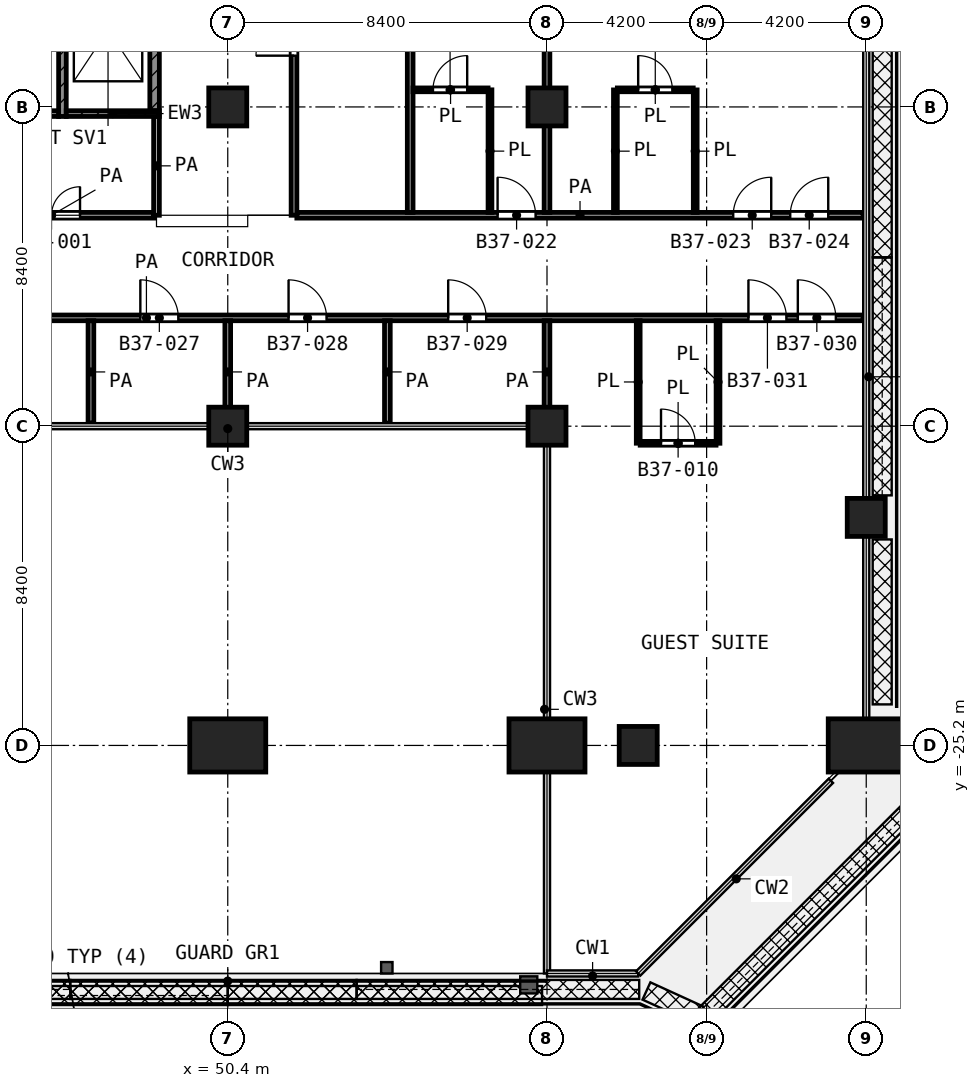
"""IFC4 building model, lengths in metres.
Left out: names, types, materials, properties, quantities, classifications, styles, units other than length and angle.
Written with IfcOpenShell. Run it as: python <this file> out.ifc"""

import sys

from ifc_helpers import new_model, si_unit, direction, frame, frame_2d, origin, origin_2d, place, context, subcontext, project, spatial, rectangle, extrude, element, fill, save


model = new_model("IFC4")
c1 = context("Model", 3, precision=1e-05, world=origin(), true_north=direction((0.0, 1.0)))
c2 = subcontext(c1, "Body", "Model", "MODEL_VIEW")
j1 = project(units=[si_unit("LENGTHUNIT", "METRE"), si_unit("PLANEANGLEUNIT", "RADIAN")], contexts=[c1])
p1 = place(None, origin())
s1 = spatial("IfcSite", under=j1, at=p1, CompositionType="ELEMENT")
p2 = place(p1, origin())
s2 = spatial("IfcBuilding", under=s1, at=p2, CompositionType="ELEMENT")
p3 = place(p2, frame((0.0, 0.0, 162.6)))
s3 = spatial("IfcBuildingStorey", under=s2, at=p3, CompositionType="ELEMENT", Elevation=162.6)
for number, where, z_axis, x_axis in (
    (1, (50.4, -8.4, 0.0), (0.0, 0.0, 1.0), (1.0, 0.0, 0.0)),
    (2, (58.8, -8.4, 0.0), (0.0, 0.0, 1.0), (1.0, 0.0, 0.0)),
    (3, (50.4, -16.8, 0.0), (0.0, 0.0, 1.0), (1.0, 0.0, 0.0)),
    (4, (58.8, -16.8, 0.0), (0.0, 0.0, 1.0), (1.0, 0.0, 0.0)),
    (5, (67.2, -19.2, 0.0), (0.0, 0.0, 1.0), (1.0, 0.0, 0.0)),
):
    element("IfcColumn", number, at=place(p3, frame(where, z_axis=z_axis, x_axis=x_axis)), inside=s3, PredefinedType="COLUMN", context=c2, shape_type="SweptSolid", body=[
        extrude(rectangle(XDim=1.0, YDim=1.0, at=origin_2d()), origin(), (0.0, 0.0, 1.0), 4.2),
    ])
p4 = place(p3, frame((50.4, -25.2, 0.0), z_axis=(0.0, 0.0, 1.0), x_axis=(-1.0, 0.0, 0.0)))
e6 = element("IfcColumn", 6, at=p4, inside=s3, PredefinedType="COLUMN", context=c2, shape_type="SweptSolid", body=[
    extrude(rectangle(XDim=2.0, YDim=1.4, at=origin_2d()), origin(), (0.0, 0.0, 1.0), 4.2),
])
p5 = place(p3, frame((61.2, -25.2, 0.0), z_axis=(0.0, 0.0, 1.0), x_axis=(1.0, 0.0, 0.0)))
e7 = element("IfcColumn", 7, at=p5, inside=s3, PredefinedType="COLUMN", context=c2, shape_type="SweptSolid", body=[
    extrude(rectangle(XDim=1.0, YDim=1.0, at=origin_2d()), origin(), (0.0, 0.0, 1.0), 4.2),
])
for number, where, z_axis, x_axis in (
    (8, (67.2, -25.2, 0.0), (0.0, 0.0, 1.0), (-1.0, 0.0, 0.0)),
    (9, (58.8, -25.2, 0.0), (0.0, 0.0, 1.0), (-1.0, 0.0, 0.0)),
):
    element("IfcColumn", number, at=place(p3, frame(where, z_axis=z_axis, x_axis=x_axis)), inside=s3, PredefinedType="COLUMN", context=c2, shape_type="SweptSolid", body=[
        extrude(rectangle(XDim=2.0, YDim=1.4, at=origin_2d()), origin(), (0.0, 0.0, 1.0), 4.2),
    ])
p6 = place(p3, frame((46.05, -8.65, 0.0), z_axis=(0.0, 0.0, 1.0), x_axis=(0.0, 1.0, 0.0)))
e10 = element("IfcWall", 10, at=p6, inside=s3, PredefinedType="SHEAR", context=c2, shape_type="SweptSolid", body=[
    extrude(rectangle(XDim=8.35, YDim=0.2, at=frame_2d((4.175, 0.0))), origin(), (0.0, 0.0, 1.0), 3.6),
])
p7 = place(p6, frame((7.0, 0.0, 0.0)))
e11 = element("IfcOpeningElement", 11, at=p7, cuts=e10, PredefinedType="OPENING", context=c2, shape_type="SweptSolid", body=[
    extrude(rectangle(XDim=1.1, YDim=2.1, at=frame_2d((0.55, 1.05))), frame((0.0, 0.11, 0.0), z_axis=(0.0, -1.0, 0.0), x_axis=(1.0, 0.0, 0.0)), (0.0, 0.0, 1.0), 0.22),
])
p8 = place(p3, frame((43.1, -8.575, 0.0), z_axis=(0.0, 0.0, 1.0), x_axis=(1.0, 0.0, 0.0)))
e12 = element("IfcWall", 12, at=p8, inside=s3, PredefinedType="SHEAR", context=c2, shape_type="SweptSolid", body=[
    extrude(rectangle(XDim=2.85, YDim=0.15, at=frame_2d((1.425, 0.0))), origin(), (0.0, 0.0, 1.0), 3.6),
])
p9 = place(p3, frame((46.15, -8.575, 0.0), z_axis=(0.0, 0.0, 1.0), x_axis=(1.0, 0.0, 0.0)))
e13 = element("IfcWall", 13, at=p9, inside=s3, PredefinedType="SHEAR", context=c2, shape_type="SweptSolid", body=[
    extrude(rectangle(XDim=2.45, YDim=0.15, at=frame_2d((1.225, 0.0))), origin(), (0.0, 0.0, 1.0), 3.6),
])
p10 = place(p3, frame((48.475, -8.5, 0.0), z_axis=(0.0, 0.0, 1.0), x_axis=(0.0, 1.0, 0.0)))
e14 = element("IfcWall", 14, at=p10, inside=s3, PredefinedType="SHEAR", context=c2, shape_type="SweptSolid", body=[
    extrude(rectangle(XDim=3.475, YDim=0.25, at=frame_2d((1.738, 0.0))), origin(), (0.0, 0.0, 1.0), 3.6),
])
p11 = place(p3, frame((61.252, -17.25, 0.0), z_axis=(0.0, 0.0, 1.0), x_axis=(1.0, 0.0, 0.0)))
e15 = element("IfcWall", 15, at=p11, inside=s3, PredefinedType="PARTITIONING", context=c2, shape_type="SweptSolid", body=[
    extrude(rectangle(XDim=1.996, YDim=0.1, at=frame_2d((0.998, 0.0))), origin(), (0.0, 0.0, 1.0), 3.6),
])
p12 = place(p11, frame((0.548, 0.0, 0.0)))
e16 = element("IfcOpeningElement", 16, at=p12, cuts=e15, PredefinedType="OPENING", context=c2, shape_type="SweptSolid", body=[
    extrude(rectangle(XDim=0.9, YDim=2.1, at=frame_2d((0.45, 1.05))), frame((0.0, 0.06, 0.0), z_axis=(0.0, -1.0, 0.0), x_axis=(1.0, 0.0, 0.0)), (0.0, 0.0, 1.0), 0.12),
])
p13 = place(p3, frame((55.275, -7.95, 0.0), z_axis=(0.0, 0.0, 1.0), x_axis=(1.0, 0.0, 0.0)))
e17 = element("IfcWall", 17, at=p13, inside=s3, PredefinedType="PARTITIONING", context=c2, shape_type="SweptSolid", body=[
    extrude(rectangle(XDim=1.975, YDim=0.1, at=frame_2d((0.988, 0.0))), origin(), (0.0, 0.0, 1.0), 3.6),
])
p14 = place(p13, frame((0.525, 0.0, 0.0)))
e18 = element("IfcOpeningElement", 18, at=p14, cuts=e17, PredefinedType="OPENING", context=c2, shape_type="SweptSolid", body=[
    extrude(rectangle(XDim=0.9, YDim=2.1, at=frame_2d((0.45, 1.05))), frame((0.0, 0.06, 0.0), z_axis=(0.0, -1.0, 0.0), x_axis=(1.0, 0.0, 0.0)), (0.0, 0.0, 1.0), 0.12),
])
p15 = place(p3, frame((60.651, -7.95, 0.0), z_axis=(0.0, 0.0, 1.0), x_axis=(1.0, 0.0, 0.0)))
e19 = element("IfcWall", 19, at=p15, inside=s3, PredefinedType="PARTITIONING", context=c2, shape_type="SweptSolid", body=[
    extrude(rectangle(XDim=1.997, YDim=0.1, at=frame_2d((0.999, 0.0))), origin(), (0.0, 0.0, 1.0), 3.6),
])
p16 = place(p15, frame((0.548, 0.0, 0.0)))
e20 = element("IfcOpeningElement", 20, at=p16, cuts=e19, PredefinedType="OPENING", context=c2, shape_type="SweptSolid", body=[
    extrude(rectangle(XDim=0.9, YDim=2.1, at=frame_2d((0.45, 1.05))), frame((0.0, 0.06, 0.0), z_axis=(0.0, -1.0, 0.0), x_axis=(1.0, 0.0, 0.0)), (0.0, 0.0, 1.0), 0.12),
])
p17 = place(p3, frame((57.3, -11.175, 0.0), z_axis=(0.0, 0.0, 1.0), x_axis=(0.0, 1.0, 0.0)))
e21 = element("IfcWall", 21, at=p17, inside=s3, PredefinedType="PARTITIONING", context=c2, shape_type="SweptSolid", body=[
    extrude(rectangle(XDim=3.225, YDim=0.1, at=frame_2d((1.613, 0.0))), origin(), (0.0, 0.0, 1.0), 3.6),
])
for number, where, z_axis, x_axis in (
    (22, (60.6, -11.175, 0.0), (0.0, 0.0, 1.0), (0.0, 1.0, 0.0)),
    (23, (61.2, -17.248, 0.0), (0.0, 0.0, 1.0), (0.0, 1.0, 0.0)),
    (24, (62.7, -11.175, 0.0), (0.0, 0.0, 1.0), (0.0, 1.0, 0.0)),
):
    element("IfcWall", number, at=place(p3, frame(where, z_axis=z_axis, x_axis=x_axis)), inside=s3, PredefinedType="PARTITIONING", context=c2, shape_type="SweptSolid", body=[
        extrude(rectangle(XDim=3.223, YDim=0.1, at=frame_2d((1.612, 0.0))), origin(), (0.0, 0.0, 1.0), 3.6),
    ])
p18 = place(p3, frame((63.3, -17.249, 0.0), z_axis=(0.0, 0.0, 1.0), x_axis=(0.0, 1.0, 0.0)))
e25 = element("IfcWall", 25, at=p18, inside=s3, PredefinedType="PARTITIONING", context=c2, shape_type="SweptSolid", body=[
    extrude(rectangle(XDim=3.224, YDim=0.1, at=frame_2d((1.612, 0.0))), origin(), (0.0, 0.0, 1.0), 3.6),
])
p19 = place(p3, frame((29.4, -13.95, 0.0), z_axis=(0.0, 0.0, 1.0), x_axis=(1.0, 0.0, 0.0)))
e26 = element("IfcWall", 26, at=p19, inside=s3, PredefinedType="PARTITIONING", context=c2, shape_type="SweptSolid", body=[
    extrude(rectangle(XDim=37.72, YDim=0.15, at=frame_2d((18.86, 0.0))), origin(), (0.0, 0.0, 1.0), 3.6),
])
p20 = place(p19, frame((14.6, 0.0, 0.0)))
e27 = element("IfcOpeningElement", 27, at=p20, cuts=e26, PredefinedType="OPENING", context=c2, shape_type="SweptSolid", body=[
    extrude(rectangle(XDim=1.0, YDim=2.1, at=frame_2d((0.5, 1.05))), frame((0.0, 0.085, 0.0), z_axis=(0.0, -1.0, 0.0), x_axis=(1.0, 0.0, 0.0)), (0.0, 0.0, 1.0), 0.17),
])
p21 = place(p19, frame((12.3, 0.0, 0.0)))
e28 = element("IfcOpeningElement", 28, at=p21, cuts=e26, PredefinedType="OPENING", context=c2, shape_type="SweptSolid", body=[
    extrude(rectangle(XDim=1.0, YDim=2.1, at=frame_2d((0.5, 1.05))), frame((0.0, 0.085, 0.0), z_axis=(0.0, -1.0, 0.0), x_axis=(1.0, 0.0, 0.0)), (0.0, 0.0, 1.0), 0.17),
])
p22 = place(p19, frame((18.7, 0.0, 0.0)))
e29 = element("IfcOpeningElement", 29, at=p22, cuts=e26, PredefinedType="OPENING", context=c2, shape_type="SweptSolid", body=[
    extrude(rectangle(XDim=1.0, YDim=2.1, at=frame_2d((0.5, 1.05))), frame((0.0, 0.085, 0.0), z_axis=(0.0, -1.0, 0.0), x_axis=(1.0, 0.0, 0.0)), (0.0, 0.0, 1.0), 0.17),
])
p23 = place(p19, frame((22.6, 0.0, 0.0)))
e30 = element("IfcOpeningElement", 30, at=p23, cuts=e26, PredefinedType="OPENING", context=c2, shape_type="SweptSolid", body=[
    extrude(rectangle(XDim=1.0, YDim=2.1, at=frame_2d((0.5, 1.05))), frame((0.0, 0.085, 0.0), z_axis=(0.0, -1.0, 0.0), x_axis=(1.0, 0.0, 0.0)), (0.0, 0.0, 1.0), 0.17),
])
p24 = place(p19, frame((26.8, 0.0, 0.0)))
e31 = element("IfcOpeningElement", 31, at=p24, cuts=e26, PredefinedType="OPENING", context=c2, shape_type="SweptSolid", body=[
    extrude(rectangle(XDim=1.0, YDim=2.1, at=frame_2d((0.5, 1.05))), frame((0.0, 0.085, 0.0), z_axis=(0.0, -1.0, 0.0), x_axis=(1.0, 0.0, 0.0)), (0.0, 0.0, 1.0), 0.17),
])
p25 = place(p19, frame((36.0, 0.0, 0.0)))
e32 = element("IfcOpeningElement", 32, at=p25, cuts=e26, PredefinedType="OPENING", context=c2, shape_type="SweptSolid", body=[
    extrude(rectangle(XDim=1.0, YDim=2.1, at=frame_2d((0.5, 1.05))), frame((0.0, 0.085, 0.0), z_axis=(0.0, -1.0, 0.0), x_axis=(1.0, 0.0, 0.0)), (0.0, 0.0, 1.0), 0.17),
])
p26 = place(p19, frame((34.7, 0.0, 0.0)))
e33 = element("IfcOpeningElement", 33, at=p26, cuts=e26, PredefinedType="OPENING", context=c2, shape_type="SweptSolid", body=[
    extrude(rectangle(XDim=1.0, YDim=2.1, at=frame_2d((0.5, 1.05))), frame((0.0, 0.085, 0.0), z_axis=(0.0, -1.0, 0.0), x_axis=(1.0, 0.0, 0.0)), (0.0, 0.0, 1.0), 0.17),
])
p27 = place(p19, frame((0.6, 0.0, 0.0)))
e34 = element("IfcOpeningElement", 34, at=p27, cuts=e26, PredefinedType="OPENING", context=c2, shape_type="SweptSolid", body=[
    extrude(rectangle(XDim=0.9, YDim=2.1, at=frame_2d((0.45, 1.05))), frame((0.0, 0.085, 0.0), z_axis=(0.0, -1.0, 0.0), x_axis=(1.0, 0.0, 0.0)), (0.0, 0.0, 1.0), 0.17),
])
p28 = place(p19, frame((2.65, 0.0, 0.0)))
e35 = element("IfcOpeningElement", 35, at=p28, cuts=e26, PredefinedType="OPENING", context=c2, shape_type="SweptSolid", body=[
    extrude(rectangle(XDim=1.0, YDim=2.1, at=frame_2d((0.5, 1.05))), frame((0.0, 0.085, 0.0), z_axis=(0.0, -1.0, 0.0), x_axis=(1.0, 0.0, 0.0)), (0.0, 0.0, 1.0), 0.17),
])
p29 = place(p19, frame((5.55, 0.0, 0.0)))
e36 = element("IfcOpeningElement", 36, at=p29, cuts=e26, PredefinedType="OPENING", context=c2, shape_type="SweptSolid", body=[
    extrude(rectangle(XDim=1.5, YDim=2.1, at=frame_2d((0.75, 1.05))), frame((0.0, 0.085, 0.0), z_axis=(0.0, -1.0, 0.0), x_axis=(1.0, 0.0, 0.0)), (0.0, 0.0, 1.0), 0.17),
])
p30 = place(p3, frame((43.075, -11.25, 0.0), z_axis=(0.0, 0.0, 1.0), x_axis=(1.0, 0.0, 0.0)))
e37 = element("IfcWall", 37, at=p30, inside=s3, PredefinedType="PARTITIONING", context=c2, shape_type="SweptSolid", body=[
    extrude(rectangle(XDim=5.375, YDim=0.15, at=frame_2d((2.688, 0.0))), origin(), (0.0, 0.0, 1.0), 3.6),
])
p31 = place(p30, frame((1.938, 0.0, 0.0)))
e38 = element("IfcOpeningElement", 38, at=p31, cuts=e37, PredefinedType="OPENING", context=c2, shape_type="SweptSolid", body=[
    extrude(rectangle(XDim=1.5, YDim=2.1, at=frame_2d((0.75, 1.05))), frame((0.0, 0.085, 0.0), z_axis=(0.0, -1.0, 0.0), x_axis=(1.0, 0.0, 0.0)), (0.0, 0.0, 1.0), 0.17),
])
p32 = place(p3, frame((52.218, -11.25, 0.0), z_axis=(0.0, 0.0, 1.0), x_axis=(1.0, 0.0, 0.0)))
e39 = element("IfcWall", 39, at=p32, inside=s3, PredefinedType="PARTITIONING", context=c2, shape_type="SweptSolid", body=[
    extrude(rectangle(XDim=14.902, YDim=0.15, at=frame_2d((7.451, 0.0))), origin(), (0.0, 0.0, 1.0), 3.6),
])
p33 = place(p32, frame((5.282, 0.0, 0.0)))
e40 = element("IfcOpeningElement", 40, at=p33, cuts=e39, PredefinedType="OPENING", context=c2, shape_type="SweptSolid", body=[
    extrude(rectangle(XDim=1.0, YDim=2.1, at=frame_2d((0.5, 1.05))), frame((0.0, 0.085, 0.0), z_axis=(0.0, -1.0, 0.0), x_axis=(1.0, 0.0, 0.0)), (0.0, 0.0, 1.0), 0.17),
])
p34 = place(p32, frame((11.482, 0.0, 0.0)))
e41 = element("IfcOpeningElement", 41, at=p34, cuts=e39, PredefinedType="OPENING", context=c2, shape_type="SweptSolid", body=[
    extrude(rectangle(XDim=1.0, YDim=2.1, at=frame_2d((0.5, 1.05))), frame((0.0, 0.085, 0.0), z_axis=(0.0, -1.0, 0.0), x_axis=(1.0, 0.0, 0.0)), (0.0, 0.0, 1.0), 0.17),
])
p35 = place(p32, frame((12.982, 0.0, 0.0)))
e42 = element("IfcOpeningElement", 42, at=p35, cuts=e39, PredefinedType="OPENING", context=c2, shape_type="SweptSolid", body=[
    extrude(rectangle(XDim=1.0, YDim=2.1, at=frame_2d((0.5, 1.05))), frame((0.0, 0.085, 0.0), z_axis=(0.0, -1.0, 0.0), x_axis=(1.0, 0.0, 0.0)), (0.0, 0.0, 1.0), 0.17),
])
p36 = place(p3, frame((46.8, -16.72, 0.0), z_axis=(0.0, 0.0, 1.0), x_axis=(0.0, 1.0, 0.0)))
e43 = element("IfcWall", 43, at=p36, inside=s3, PredefinedType="PARTITIONING", context=c2, shape_type="SweptSolid", body=[
    extrude(rectangle(XDim=2.695, YDim=0.15, at=frame_2d((1.348, 0.0))), origin(), (0.0, 0.0, 1.0), 3.6),
])
p37 = place(p3, frame((48.525, -11.25, 0.0), z_axis=(0.0, 0.0, 1.0), x_axis=(0.0, 1.0, 0.0)))
e44 = element("IfcWall", 44, at=p37, inside=s3, PredefinedType="PARTITIONING", context=c2, shape_type="SweptSolid", body=[
    extrude(rectangle(XDim=2.6, YDim=0.15, at=frame_2d((1.3, 0.0))), origin(), (0.0, 0.0, 1.0), 3.6),
])
p38 = place(p3, frame((50.4, -16.72, 0.0), z_axis=(0.0, 0.0, 1.0), x_axis=(0.0, 1.0, 0.0)))
e45 = element("IfcWall", 45, at=p38, inside=s3, PredefinedType="PARTITIONING", context=c2, shape_type="SweptSolid", body=[
    extrude(rectangle(XDim=2.695, YDim=0.15, at=frame_2d((1.348, 0.0))), origin(), (0.0, 0.0, 1.0), 3.6),
])
p39 = place(p3, frame((52.143, -11.25, 0.0), z_axis=(0.0, 0.0, 1.0), x_axis=(0.0, 1.0, 0.0)))
e46 = element("IfcWall", 46, at=p39, inside=s3, PredefinedType="PARTITIONING", context=c2, shape_type="SweptSolid", body=[
    extrude(rectangle(XDim=9.397, YDim=0.15, at=frame_2d((4.698, 0.0))), origin(), (0.0, 0.0, 1.0), 3.6),
])
p40 = place(p39, frame((4.199, 0.0, 0.0)))
e47 = element("IfcOpeningElement", 47, at=p40, cuts=e46, PredefinedType="OPENING", context=c2, shape_type="SweptSolid", body=[
    extrude(rectangle(XDim=1.0, YDim=2.1, at=frame_2d((0.5, 1.05))), frame((0.0, 0.085, 0.0), z_axis=(0.0, -1.0, 0.0), x_axis=(1.0, 0.0, 0.0)), (0.0, 0.0, 1.0), 0.17),
])
p41 = place(p3, frame((54.6, -16.72, 0.0), z_axis=(0.0, 0.0, 1.0), x_axis=(0.0, 1.0, 0.0)))
e48 = element("IfcWall", 48, at=p41, inside=s3, PredefinedType="PARTITIONING", context=c2, shape_type="SweptSolid", body=[
    extrude(rectangle(XDim=2.695, YDim=0.15, at=frame_2d((1.348, 0.0))), origin(), (0.0, 0.0, 1.0), 3.6),
])
p42 = place(p3, frame((55.2, -11.175, 0.0), z_axis=(0.0, 0.0, 1.0), x_axis=(0.0, 1.0, 0.0)))
e49 = element("IfcWall", 49, at=p42, inside=s3, PredefinedType="PARTITIONING", context=c2, shape_type="SweptSolid", body=[
    extrude(rectangle(XDim=11.095, YDim=0.15, at=frame_2d((5.547, 0.0))), origin(), (0.0, 0.0, 1.0), 2.7),
])
p43 = place(p3, frame((58.8, -16.72, 0.0), z_axis=(0.0, 0.0, 1.0), x_axis=(0.0, 1.0, 0.0)))
e50 = element("IfcWall", 50, at=p43, inside=s3, PredefinedType="PARTITIONING", context=c2, shape_type="SweptSolid", body=[
    extrude(rectangle(XDim=2.695, YDim=0.15, at=frame_2d((1.348, 0.0))), origin(), (0.0, 0.0, 1.0), 3.6),
])
p44 = place(p3, frame((58.8, -11.175, 0.0), z_axis=(0.0, 0.0, 1.0), x_axis=(0.0, 1.0, 0.0)))
e51 = element("IfcWall", 51, at=p44, inside=s3, PredefinedType="PARTITIONING", context=c2, shape_type="SweptSolid", body=[
    extrude(rectangle(XDim=11.095, YDim=0.15, at=frame_2d((5.547, 0.0))), origin(), (0.0, 0.0, 1.0), 2.7),
])
p45 = place(p31, origin())
e52 = element("IfcDoor", 52, at=p45, inside=s3, OperationType="DOUBLE_DOOR_SINGLE_SWING", PredefinedType="DOOR", context=c2, shape_type="SweptSolid", body=[
    extrude(rectangle(XDim=1.5, YDim=2.1, at=frame_2d((0.75, 1.05))), frame((0.0, 0.025, 0.0), z_axis=(0.0, -1.0, 0.0), x_axis=(1.0, 0.0, 0.0)), (0.0, 0.0, 1.0), 0.05),
])
fill(e38, e52)
p46 = place(p40, origin())
e53 = element("IfcDoor", 53, at=p46, inside=s3, OperationType="SINGLE_SWING_LEFT", PredefinedType="DOOR", context=c2, shape_type="SweptSolid", body=[
    extrude(rectangle(XDim=1.0, YDim=2.1, at=frame_2d((0.5, 1.05))), frame((0.0, 0.025, 0.0), z_axis=(0.0, -1.0, 0.0), x_axis=(1.0, 0.0, 0.0)), (0.0, 0.0, 1.0), 0.05),
])
fill(e47, e53)
p47 = place(p33, origin())
e54 = element("IfcDoor", 54, at=p47, inside=s3, OperationType="SINGLE_SWING_LEFT", PredefinedType="DOOR", context=c2, shape_type="SweptSolid", body=[
    extrude(rectangle(XDim=1.0, YDim=2.1, at=frame_2d((0.5, 1.05))), frame((0.0, 0.025, 0.0), z_axis=(0.0, -1.0, 0.0), x_axis=(1.0, 0.0, 0.0)), (0.0, 0.0, 1.0), 0.05),
])
fill(e40, e54)
p48 = place(p14, origin())
e55 = element("IfcDoor", 55, at=p48, inside=s3, OperationType="SINGLE_SWING_RIGHT", PredefinedType="DOOR", context=c2, shape_type="SweptSolid", body=[
    extrude(rectangle(XDim=0.9, YDim=2.1, at=frame_2d((0.45, 1.05))), frame((0.0, 0.025, 0.0), z_axis=(0.0, -1.0, 0.0), x_axis=(1.0, 0.0, 0.0)), (0.0, 0.0, 1.0), 0.05),
])
fill(e18, e55)
p49 = place(p34, origin())
e56 = element("IfcDoor", 56, at=p49, inside=s3, OperationType="SINGLE_SWING_RIGHT", PredefinedType="DOOR", context=c2, shape_type="SweptSolid", body=[
    extrude(rectangle(XDim=1.0, YDim=2.1, at=frame_2d((0.5, 1.05))), frame((0.0, 0.025, 0.0), z_axis=(0.0, -1.0, 0.0), x_axis=(1.0, 0.0, 0.0)), (0.0, 0.0, 1.0), 0.05),
])
fill(e41, e56)
p50 = place(p35, origin())
e57 = element("IfcDoor", 57, at=p50, inside=s3, OperationType="SINGLE_SWING_RIGHT", PredefinedType="DOOR", context=c2, shape_type="SweptSolid", body=[
    extrude(rectangle(XDim=1.0, YDim=2.1, at=frame_2d((0.5, 1.05))), frame((0.0, 0.025, 0.0), z_axis=(0.0, -1.0, 0.0), x_axis=(1.0, 0.0, 0.0)), (0.0, 0.0, 1.0), 0.05),
])
fill(e42, e57)
p51 = place(p16, origin())
e58 = element("IfcDoor", 58, at=p51, inside=s3, OperationType="SINGLE_SWING_LEFT", PredefinedType="DOOR", context=c2, shape_type="SweptSolid", body=[
    extrude(rectangle(XDim=0.9, YDim=2.1, at=frame_2d((0.45, 1.05))), frame((0.0, 0.025, 0.0), z_axis=(0.0, -1.0, 0.0), x_axis=(1.0, 0.0, 0.0)), (0.0, 0.0, 1.0), 0.05),
])
fill(e20, e58)
p52 = place(p22, origin())
e59 = element("IfcDoor", 59, at=p52, inside=s3, OperationType="SINGLE_SWING_LEFT", PredefinedType="DOOR", context=c2, shape_type="SweptSolid", body=[
    extrude(rectangle(XDim=1.0, YDim=2.1, at=frame_2d((0.5, 1.05))), frame((0.0, 0.025, 0.0), z_axis=(0.0, -1.0, 0.0), x_axis=(1.0, 0.0, 0.0)), (0.0, 0.0, 1.0), 0.05),
])
fill(e29, e59)
p53 = place(p23, origin())
e60 = element("IfcDoor", 60, at=p53, inside=s3, OperationType="SINGLE_SWING_LEFT", PredefinedType="DOOR", context=c2, shape_type="SweptSolid", body=[
    extrude(rectangle(XDim=1.0, YDim=2.1, at=frame_2d((0.5, 1.05))), frame((0.0, 0.025, 0.0), z_axis=(0.0, -1.0, 0.0), x_axis=(1.0, 0.0, 0.0)), (0.0, 0.0, 1.0), 0.05),
])
fill(e30, e60)
p54 = place(p24, origin())
e61 = element("IfcDoor", 61, at=p54, inside=s3, OperationType="SINGLE_SWING_LEFT", PredefinedType="DOOR", context=c2, shape_type="SweptSolid", body=[
    extrude(rectangle(XDim=1.0, YDim=2.1, at=frame_2d((0.5, 1.05))), frame((0.0, 0.025, 0.0), z_axis=(0.0, -1.0, 0.0), x_axis=(1.0, 0.0, 0.0)), (0.0, 0.0, 1.0), 0.05),
])
fill(e31, e61)
p55 = place(p25, origin())
e62 = element("IfcDoor", 62, at=p55, inside=s3, OperationType="SINGLE_SWING_LEFT", PredefinedType="DOOR", context=c2, shape_type="SweptSolid", body=[
    extrude(rectangle(XDim=1.0, YDim=2.1, at=frame_2d((0.5, 1.05))), frame((0.0, 0.025, 0.0), z_axis=(0.0, -1.0, 0.0), x_axis=(1.0, 0.0, 0.0)), (0.0, 0.0, 1.0), 0.05),
])
fill(e32, e62)
p56 = place(p26, origin())
e63 = element("IfcDoor", 63, at=p56, inside=s3, OperationType="SINGLE_SWING_LEFT", PredefinedType="DOOR", context=c2, shape_type="SweptSolid", body=[
    extrude(rectangle(XDim=1.0, YDim=2.1, at=frame_2d((0.5, 1.05))), frame((0.0, 0.025, 0.0), z_axis=(0.0, -1.0, 0.0), x_axis=(1.0, 0.0, 0.0)), (0.0, 0.0, 1.0), 0.05),
])
fill(e33, e63)
p57 = place(p12, origin())
e64 = element("IfcDoor", 64, at=p57, inside=s3, OperationType="SINGLE_SWING_LEFT", PredefinedType="DOOR", context=c2, shape_type="SweptSolid", body=[
    extrude(rectangle(XDim=0.9, YDim=2.1, at=frame_2d((0.45, 1.05))), frame((0.0, 0.025, 0.0), z_axis=(0.0, -1.0, 0.0), x_axis=(1.0, 0.0, 0.0)), (0.0, 0.0, 1.0), 0.05),
])
fill(e16, e64)
save(model, sys.argv[1])
